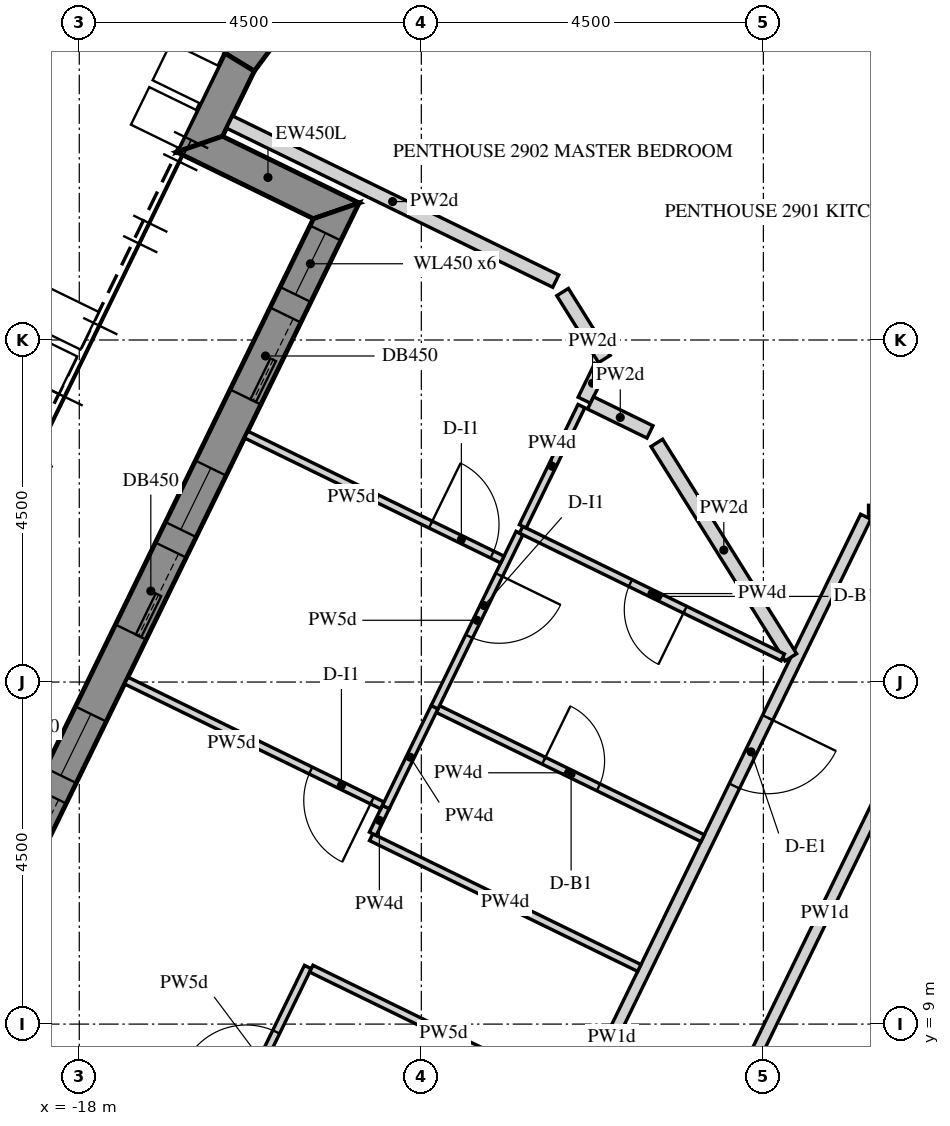
"""IFC4 building model, lengths in metres.
Left out: names, types, materials, properties, quantities, classifications, styles, units other than length and angle.
Written with IfcOpenShell. Run it as: python <this file> out.ifc"""

import sys

from ifc_helpers import new_model, si_unit, direction, frame, frame_2d, origin, place, context, subcontext, project, spatial, polyline, rectangle, outline, extrude, element, fill, save


model = new_model("IFC4")
c1 = context("Model", 3, precision=1e-05, world=origin(), true_north=direction((0.0, 1.0)))
c2 = subcontext(c1, "Body", "Model", "MODEL_VIEW")
j1 = project(units=[si_unit("LENGTHUNIT", "METRE"), si_unit("PLANEANGLEUNIT", "RADIAN")], contexts=[c1])
p1 = place(None, origin())
s1 = spatial("IfcSite", under=j1, at=p1, CompositionType="ELEMENT")
p2 = place(p1, origin())
s2 = spatial("IfcBuilding", under=s1, at=p2, CompositionType="ELEMENT")
p3 = place(p2, frame((0.0, 0.0, 369.0)))
s3 = spatial("IfcBuildingStorey", under=s2, at=p3, CompositionType="ELEMENT", Elevation=369.0)
p4 = place(p3, frame((-15.056, 22.776, -0.15), z_axis=(0.0, 0.0, 1.0), x_axis=(-0.597089203515, -0.802174845682, 0.0)))
e1 = element("IfcWall", 1, at=p4, inside=s3, PredefinedType="SOLIDWALL", context=c2, shape_type="SweptSolid", body=[
    extrude(outline(polyline([(-0.042, -0.225), (1.418, -0.225), (1.376, 0.225), (0.042, 0.225), (-0.042, -0.225)])), origin(), (0.0, 0.0, 1.0), 3.9),
])
p5 = place(p3, frame((-15.89, 21.655, -0.15), z_axis=(0.0, 0.0, 1.0), x_axis=(-0.438319390103, -0.898819287877, 0.0)))
e2 = element("IfcWall", 2, at=p5, inside=s3, PredefinedType="SOLIDWALL", context=c2, shape_type="SweptSolid", body=[
    extrude(outline(polyline([(-0.021, -0.225), (1.425, -0.225), (0.975, 0.225), (0.021, 0.225), (-0.021, -0.225)])), origin(), (0.0, 0.0, 1.0), 3.9),
])
p6 = place(p3, frame((-16.416, 20.576, -0.15), z_axis=(0.0, 0.0, 1.0), x_axis=(0.898730898244, -0.438500595829, 0.0)))
e3 = element("IfcWall", 3, at=p6, inside=s3, PredefinedType="SOLIDWALL", context=c2, shape_type="SweptSolid", body=[
    extrude(outline(polyline([(-0.225, -0.225), (1.775, -0.225), (2.225, 0.225), (0.225, 0.225), (-0.225, -0.225)])), origin(), (0.0, 0.0, 1.0), 3.9),
])
p7 = place(p3, frame((-14.619, 19.699, -0.15), z_axis=(0.0, 0.0, 1.0), x_axis=(-0.438373747484, -0.898792777851, 0.0)))
e4 = element("IfcWall", 4, at=p7, inside=s3, PredefinedType="SOLIDWALL", context=c2, shape_type="SweptSolid", body=[
    extrude(outline(polyline([(0.225, -0.225), (20.506, -0.225), (20.957, 0.225), (-0.225, 0.225), (0.225, -0.225)])), origin(), (0.0, 0.0, 1.0), 3.9),
])
p8 = place(p7, frame((0.325, 0.0, 1.05)))
e5 = element("IfcOpeningElement", 5, at=p8, cuts=e4, PredefinedType="OPENING", context=c2, shape_type="SweptSolid", body=[
    extrude(rectangle(XDim=0.9, YDim=1.5, at=frame_2d((0.45, 0.75))), frame((0.0, 0.235, 0.0), z_axis=(0.0, -1.0, 0.0), x_axis=(1.0, 0.0, 0.0)), (0.0, 0.0, 1.0), 0.47),
])
p9 = place(p7, frame((1.525, 0.0, 0.15)))
e6 = element("IfcOpeningElement", 6, at=p9, cuts=e4, PredefinedType="OPENING", context=c2, shape_type="SweptSolid", body=[
    extrude(rectangle(XDim=1.2, YDim=2.4, at=frame_2d((0.6, 1.2))), frame((0.0, 0.235, 0.0), z_axis=(0.0, -1.0, 0.0), x_axis=(1.0, 0.0, 0.0)), (0.0, 0.0, 1.0), 0.47),
])
p10 = place(p7, frame((3.766, 0.0, 1.05)))
e7 = element("IfcOpeningElement", 7, at=p10, cuts=e4, PredefinedType="OPENING", context=c2, shape_type="SweptSolid", body=[
    extrude(rectangle(XDim=0.9, YDim=1.5, at=frame_2d((0.45, 0.75))), frame((0.0, 0.235, 0.0), z_axis=(0.0, -1.0, 0.0), x_axis=(1.0, 0.0, 0.0)), (0.0, 0.0, 1.0), 0.47),
])
p11 = place(p7, frame((4.966, 0.0, 0.15)))
e8 = element("IfcOpeningElement", 8, at=p11, cuts=e4, PredefinedType="OPENING", context=c2, shape_type="SweptSolid", body=[
    extrude(rectangle(XDim=1.2, YDim=2.4, at=frame_2d((0.6, 1.2))), frame((0.0, 0.235, 0.0), z_axis=(0.0, -1.0, 0.0), x_axis=(1.0, 0.0, 0.0)), (0.0, 0.0, 1.0), 0.47),
])
p12 = place(p7, frame((7.366, 0.0, 1.05)))
e9 = element("IfcOpeningElement", 9, at=p12, cuts=e4, PredefinedType="OPENING", context=c2, shape_type="SweptSolid", body=[
    extrude(rectangle(XDim=0.9, YDim=1.5, at=frame_2d((0.45, 0.75))), frame((0.0, 0.235, 0.0), z_axis=(0.0, -1.0, 0.0), x_axis=(1.0, 0.0, 0.0)), (0.0, 0.0, 1.0), 0.47),
])
p13 = place(p7, frame((8.566, 0.0, 0.15)))
e10 = element("IfcOpeningElement", 10, at=p13, cuts=e4, PredefinedType="OPENING", context=c2, shape_type="SweptSolid", body=[
    extrude(rectangle(XDim=1.2, YDim=2.4, at=frame_2d((0.6, 1.2))), frame((0.0, 0.235, 0.0), z_axis=(0.0, -1.0, 0.0), x_axis=(1.0, 0.0, 0.0)), (0.0, 0.0, 1.0), 0.47),
])
p14 = place(p7, frame((10.966, 0.0, 1.05)))
e11 = element("IfcOpeningElement", 11, at=p14, cuts=e4, PredefinedType="OPENING", context=c2, shape_type="SweptSolid", body=[
    extrude(rectangle(XDim=0.9, YDim=1.5, at=frame_2d((0.45, 0.75))), frame((0.0, 0.235, 0.0), z_axis=(0.0, -1.0, 0.0), x_axis=(1.0, 0.0, 0.0)), (0.0, 0.0, 1.0), 0.47),
])
p15 = place(p7, frame((12.166, 0.0, 0.15)))
e12 = element("IfcOpeningElement", 12, at=p15, cuts=e4, PredefinedType="OPENING", context=c2, shape_type="SweptSolid", body=[
    extrude(rectangle(XDim=1.2, YDim=2.4, at=frame_2d((0.6, 1.2))), frame((0.0, 0.235, 0.0), z_axis=(0.0, -1.0, 0.0), x_axis=(1.0, 0.0, 0.0)), (0.0, 0.0, 1.0), 0.47),
])
p16 = place(p7, frame((14.566, 0.0, 1.05)))
e13 = element("IfcOpeningElement", 13, at=p16, cuts=e4, PredefinedType="OPENING", context=c2, shape_type="SweptSolid", body=[
    extrude(rectangle(XDim=0.9, YDim=1.5, at=frame_2d((0.45, 0.75))), frame((0.0, 0.235, 0.0), z_axis=(0.0, -1.0, 0.0), x_axis=(1.0, 0.0, 0.0)), (0.0, 0.0, 1.0), 0.47),
])
p17 = place(p7, frame((15.766, 0.0, 0.15)))
e14 = element("IfcOpeningElement", 14, at=p17, cuts=e4, PredefinedType="OPENING", context=c2, shape_type="SweptSolid", body=[
    extrude(rectangle(XDim=1.2, YDim=2.4, at=frame_2d((0.6, 1.2))), frame((0.0, 0.235, 0.0), z_axis=(0.0, -1.0, 0.0), x_axis=(1.0, 0.0, 0.0)), (0.0, 0.0, 1.0), 0.47),
])
p18 = place(p7, frame((18.007, 0.0, 1.05)))
e15 = element("IfcOpeningElement", 15, at=p18, cuts=e4, PredefinedType="OPENING", context=c2, shape_type="SweptSolid", body=[
    extrude(rectangle(XDim=0.9, YDim=1.5, at=frame_2d((0.45, 0.75))), frame((0.0, 0.235, 0.0), z_axis=(0.0, -1.0, 0.0), x_axis=(1.0, 0.0, 0.0)), (0.0, 0.0, 1.0), 0.47),
])
p19 = place(p7, frame((19.207, 0.0, 0.15)))
e16 = element("IfcOpeningElement", 16, at=p19, cuts=e4, PredefinedType="OPENING", context=c2, shape_type="SweptSolid", body=[
    extrude(rectangle(XDim=1.2, YDim=2.4, at=frame_2d((0.6, 1.2))), frame((0.0, 0.235, 0.0), z_axis=(0.0, -1.0, 0.0), x_axis=(1.0, 0.0, 0.0)), (0.0, 0.0, 1.0), 0.47),
])
p20 = place(p3, frame((-5.673, 9.825, -0.15), z_axis=(0.0, 0.0, 1.0), x_axis=(-0.499995046907, -0.866028263435, 0.0)))
e17 = element("IfcWall", 17, at=p20, inside=s3, PredefinedType="SHEAR", context=c2, shape_type="SweptSolid", body=[
    extrude(outline(polyline([(-0.101, -0.175), (11.446, -0.175), (11.244, 0.175), (0.101, 0.175), (-0.101, -0.175)])), origin(), (0.0, 0.0, 1.0), 3.9),
])
p21 = place(p20, frame((4.801, 0.0, 0.15)))
e18 = element("IfcOpeningElement", 18, at=p21, cuts=e17, PredefinedType="OPENING", context=c2, shape_type="SweptSolid", body=[
    extrude(rectangle(XDim=1.8, YDim=2.4, at=frame_2d((0.9, 1.2))), frame((0.0, 0.185, 0.0), z_axis=(0.0, -1.0, 0.0), x_axis=(1.0, 0.0, 0.0)), (0.0, 0.0, 1.0), 0.37),
])
p22 = place(p3, frame((5.887, 15.75, 0.0), z_axis=(0.0, 0.0, 1.0), x_axis=(-1.0, 0.0, 0.0)))
e19 = element("IfcWall", 19, at=p22, inside=s3, PredefinedType="PARTITIONING", context=c2, shape_type="SweptSolid", body=[
    extrude(rectangle(XDim=13.503, YDim=0.15, at=frame_2d((6.752, 0.0))), origin(), (0.0, 0.0, 1.0), 2.47),
])
p23 = place(p22, frame((3.825, 0.0, 0.0)))
e20 = element("IfcOpeningElement", 20, at=p23, cuts=e19, PredefinedType="OPENING", context=c2, shape_type="SweptSolid", body=[
    extrude(rectangle(XDim=1.0, YDim=2.1, at=frame_2d((0.5, 1.05))), frame((0.0, 0.085, 0.0), z_axis=(0.0, -1.0, 0.0), x_axis=(1.0, 0.0, 0.0)), (0.0, 0.0, 1.0), 0.17),
])
p24 = place(p3, frame((-7.653, 15.675, 0.0), z_axis=(0.0, 0.0, 1.0), x_axis=(-0.438369669055, -0.898794767037, 0.0)))
e21 = element("IfcWall", 21, at=p24, inside=s3, PredefinedType="PARTITIONING", context=c2, shape_type="SweptSolid", body=[
    extrude(rectangle(XDim=15.243, YDim=0.15, at=frame_2d((7.621, 0.0))), origin(), (0.0, 0.0, 1.0), 2.47),
])
p25 = place(p24, frame((2.942, 0.0, 0.0)))
e22 = element("IfcOpeningElement", 22, at=p25, cuts=e21, PredefinedType="OPENING", context=c2, shape_type="SweptSolid", body=[
    extrude(rectangle(XDim=1.0, YDim=2.1, at=frame_2d((0.5, 1.05))), frame((0.0, 0.085, 0.0), z_axis=(0.0, -1.0, 0.0), x_axis=(1.0, 0.0, 0.0)), (0.0, 0.0, 1.0), 0.17),
])
p26 = place(p3, frame((-9.893, 6.977, 0.0), z_axis=(0.0, 0.0, 1.0), x_axis=(0.438380229518, 0.898789616299, 0.0)))
e23 = element("IfcWall", 23, at=p26, inside=s3, PredefinedType="PARTITIONING", context=c2, shape_type="SweptSolid", body=[
    extrude(rectangle(XDim=7.758, YDim=0.15, at=frame_2d((3.879, 0.0))), origin(), (0.0, 0.0, 1.0), 2.47),
])
p27 = place(p3, frame((-16.024, 20.868, 0.0), z_axis=(0.0, 0.0, 1.0), x_axis=(0.898790554329, -0.438378306317, 0.0)))
e24 = element("IfcWall", 24, at=p27, inside=s3, PredefinedType="PARTITIONING", context=c2, shape_type="SweptSolid", body=[
    extrude(rectangle(XDim=4.776, YDim=0.18, at=frame_2d((2.388, 0.0))), origin(), (0.0, 0.0, 1.0), 2.47),
])
p28 = place(p3, frame((-11.642, 18.63, 0.0), z_axis=(0.0, 0.0, 1.0), x_axis=(0.530041214548, -0.847971880949, 0.0)))
e25 = element("IfcWall", 25, at=p28, inside=s3, PredefinedType="PARTITIONING", context=c2, shape_type="SweptSolid", body=[
    extrude(rectangle(XDim=1.038, YDim=0.18, at=frame_2d((0.519, 0.0))), origin(), (0.0, 0.0, 1.0), 2.47),
])
p29 = place(p3, frame((-11.138, 17.655, 0.0), z_axis=(0.0, 0.0, 1.0), x_axis=(-0.43834617456, -0.89880622564, 0.0)))
e26 = element("IfcWall", 26, at=p29, inside=s3, PredefinedType="PARTITIONING", context=c2, shape_type="SweptSolid", body=[
    extrude(rectangle(XDim=0.497, YDim=0.18, at=frame_2d((0.249, 0.0))), origin(), (0.0, 0.0, 1.0), 2.47),
])
p30 = place(p3, frame((-11.273, 17.172, 0.0), z_axis=(0.0, 0.0, 1.0), x_axis=(0.898819713643, -0.438318517025, 0.0)))
e27 = element("IfcWall", 27, at=p30, inside=s3, PredefinedType="PARTITIONING", context=c2, shape_type="SweptSolid", body=[
    extrude(rectangle(XDim=0.869, YDim=0.18, at=frame_2d((0.435, 0.0))), origin(), (0.0, 0.0, 1.0), 2.47),
])
p31 = place(p3, frame((-10.402, 16.647, 0.0), z_axis=(0.0, 0.0, 1.0), x_axis=(0.529853827573, -0.84808898201, 0.0)))
e28 = element("IfcWall", 28, at=p31, inside=s3, PredefinedType="PARTITIONING", context=c2, shape_type="SweptSolid", body=[
    extrude(rectangle(XDim=3.327, YDim=0.18, at=frame_2d((1.664, 0.0))), origin(), (0.0, 0.0, 1.0), 2.47),
])
p32 = place(p3, frame((-10.632, 9.738, 0.0), z_axis=(0.0, 0.0, 1.0), x_axis=(-0.898787574002, 0.438384416717, 0.0)))
e29 = element("IfcWall", 29, at=p32, inside=s3, PredefinedType="PARTITIONING", context=c2, shape_type="SweptSolid", body=[
    extrude(rectangle(XDim=3.925, YDim=0.1, at=frame_2d((1.962, 0.0))), origin(), (0.0, 0.0, 1.0), 2.47),
])
p33 = place(p3, frame((-14.138, 11.504, 0.0), z_axis=(0.0, 0.0, 1.0), x_axis=(0.438214838481, 0.898870266131, 0.0)))
e30 = element("IfcWall", 30, at=p33, inside=s3, PredefinedType="PARTITIONING", context=c2, shape_type="SweptSolid", body=[
    extrude(rectangle(XDim=0.392, YDim=0.1, at=frame_2d((0.196, 0.0))), origin(), (0.0, 0.0, 1.0), 2.47),
])
p34 = place(p3, frame((-14.012, 11.876, 0.0), z_axis=(0.0, 0.0, 1.0), x_axis=(-0.898810362659, 0.438337691713, 0.0)))
e31 = element("IfcWall", 31, at=p34, inside=s3, PredefinedType="PARTITIONING", context=c2, shape_type="SweptSolid", body=[
    extrude(rectangle(XDim=3.75, YDim=0.1, at=frame_2d((1.875, 0.0))), origin(), (0.0, 0.0, 1.0), 2.47),
])
p35 = place(p34, frame((0.15, 0.0, 0.0)))
e32 = element("IfcOpeningElement", 32, at=p35, cuts=e31, PredefinedType="OPENING", context=c2, shape_type="SweptSolid", body=[
    extrude(rectangle(XDim=0.9, YDim=2.1, at=frame_2d((0.45, 1.05))), frame((0.0, 0.06, 0.0), z_axis=(0.0, -1.0, 0.0), x_axis=(1.0, 0.0, 0.0)), (0.0, 0.0, 1.0), 0.12),
])
p36 = place(p3, frame((-16.198, 7.28, 0.0), z_axis=(0.0, 0.0, 1.0), x_axis=(0.438385151252, 0.898787215731, 0.0)))
e33 = element("IfcWall", 33, at=p36, inside=s3, PredefinedType="PARTITIONING", context=c2, shape_type="SweptSolid", body=[
    extrude(rectangle(XDim=2.75, YDim=0.1, at=frame_2d((1.375, 0.0))), origin(), (0.0, 0.0, 1.0), 2.47),
])
p37 = place(p36, frame((0.9, 0.0, 0.0)))
e34 = element("IfcOpeningElement", 34, at=p37, cuts=e33, PredefinedType="OPENING", context=c2, shape_type="SweptSolid", body=[
    extrude(rectangle(XDim=0.9, YDim=2.1, at=frame_2d((0.45, 1.05))), frame((0.0, 0.06, 0.0), z_axis=(0.0, -1.0, 0.0), x_axis=(1.0, 0.0, 0.0)), (0.0, 0.0, 1.0), 0.12),
])
p38 = place(p3, frame((-14.948, 9.729, 0.0), z_axis=(0.0, 0.0, 1.0), x_axis=(0.898793875229, -0.438371497535, 0.0)))
e35 = element("IfcWall", 35, at=p38, inside=s3, PredefinedType="PARTITIONING", context=c2, shape_type="SweptSolid", body=[
    extrude(rectangle(XDim=3.875, YDim=0.1, at=frame_2d((1.938, 0.0))), origin(), (0.0, 0.0, 1.0), 2.47),
])
p39 = place(p3, frame((-13.327, 13.167, 0.0), z_axis=(0.0, 0.0, 1.0), x_axis=(0.898812080899, -0.438334168449, 0.0)))
e36 = element("IfcWall", 36, at=p39, inside=s3, PredefinedType="PARTITIONING", context=c2, shape_type="SweptSolid", body=[
    extrude(rectangle(XDim=3.925, YDim=0.1, at=frame_2d((1.962, 0.0))), origin(), (0.0, 0.0, 1.0), 2.47),
])
p40 = place(p39, frame((1.6, 0.0, 0.0)))
e37 = element("IfcOpeningElement", 37, at=p40, cuts=e36, PredefinedType="OPENING", context=c2, shape_type="SweptSolid", body=[
    extrude(rectangle(XDim=0.8, YDim=2.1, at=frame_2d((0.4, 1.05))), frame((0.0, 0.06, 0.0), z_axis=(0.0, -1.0, 0.0), x_axis=(1.0, 0.0, 0.0)), (0.0, 0.0, 1.0), 0.12),
])
p41 = place(p3, frame((-12.208, 15.46, 0.0), z_axis=(0.0, 0.0, 1.0), x_axis=(-0.438359600369, -0.898799677773, 0.0)))
e38 = element("IfcWall", 38, at=p41, inside=s3, PredefinedType="PARTITIONING", context=c2, shape_type="SweptSolid", body=[
    extrude(rectangle(XDim=2.554, YDim=0.1, at=frame_2d((1.277, 0.0))), origin(), (0.0, 0.0, 1.0), 2.47),
])
p42 = place(p41, frame((0.612, 0.0, 0.0)))
e39 = element("IfcOpeningElement", 39, at=p42, cuts=e38, PredefinedType="OPENING", context=c2, shape_type="SweptSolid", body=[
    extrude(rectangle(XDim=0.9, YDim=2.1, at=frame_2d((0.45, 1.05))), frame((0.0, 0.06, 0.0), z_axis=(0.0, -1.0, 0.0), x_axis=(1.0, 0.0, 0.0)), (0.0, 0.0, 1.0), 0.12),
])
p43 = place(p3, frame((-8.745, 13.824, 0.0), z_axis=(0.0, 0.0, 1.0), x_axis=(-0.898794787177, 0.43836962776, 0.0)))
e40 = element("IfcWall", 40, at=p43, inside=s3, PredefinedType="PARTITIONING", context=c2, shape_type="SweptSolid", body=[
    extrude(rectangle(XDim=3.83, YDim=0.1, at=frame_2d((1.915, 0.0))), origin(), (0.0, 0.0, 1.0), 2.47),
])
p44 = place(p43, frame((1.43, 0.0, 0.0)))
e41 = element("IfcOpeningElement", 41, at=p44, cuts=e40, PredefinedType="OPENING", context=c2, shape_type="SweptSolid", body=[
    extrude(rectangle(XDim=0.8, YDim=2.1, at=frame_2d((0.4, 1.05))), frame((0.0, 0.06, 0.0), z_axis=(0.0, -1.0, 0.0), x_axis=(1.0, 0.0, 0.0)), (0.0, 0.0, 1.0), 0.12),
])
p45 = place(p3, frame((-13.326, 13.168, 0.0), z_axis=(0.0, 0.0, 1.0), x_axis=(-0.438377585285, -0.898790906006, 0.0)))
e42 = element("IfcWall", 42, at=p45, inside=s3, PredefinedType="PARTITIONING", context=c2, shape_type="SweptSolid", body=[
    extrude(rectangle(XDim=1.462, YDim=0.1, at=frame_2d((0.731, 0.0))), origin(), (0.0, 0.0, 1.0), 2.47),
])
p46 = place(p3, frame((-15.804, 16.756, 0.0), z_axis=(0.0, 0.0, 1.0), x_axis=(0.89878471246, -0.438390283479, 0.0)))
e43 = element("IfcWall", 43, at=p46, inside=s3, PredefinedType="PARTITIONING", context=c2, shape_type="SweptSolid", body=[
    extrude(rectangle(XDim=3.75, YDim=0.1, at=frame_2d((1.875, 0.0))), origin(), (0.0, 0.0, 1.0), 2.47),
])
p47 = place(p46, frame((2.7, 0.0, 0.0)))
e44 = element("IfcOpeningElement", 44, at=p47, cuts=e43, PredefinedType="OPENING", context=c2, shape_type="SweptSolid", body=[
    extrude(rectangle(XDim=0.9, YDim=2.1, at=frame_2d((0.45, 1.05))), frame((0.0, 0.06, 0.0), z_axis=(0.0, -1.0, 0.0), x_axis=(1.0, 0.0, 0.0)), (0.0, 0.0, 1.0), 0.12),
])
p48 = place(p3, frame((-12.165, 15.548, 0.0), z_axis=(0.0, 0.0, 1.0), x_axis=(0.438426364669, 0.89876711264, 0.0)))
e45 = element("IfcWall", 45, at=p48, inside=s3, PredefinedType="PARTITIONING", context=c2, shape_type="SweptSolid", body=[
    extrude(rectangle(XDim=1.76, YDim=0.1, at=frame_2d((0.88, 0.0))), origin(), (0.0, 0.0, 1.0), 2.47),
])
p49 = place(p8, frame((0.0, 0.155, 0.0)))
e46 = element("IfcWindow", 46, at=p49, inside=s3, PartitioningType="SINGLE_PANEL", PredefinedType="WINDOW", context=c2, shape_type="SweptSolid", body=[
    extrude(rectangle(XDim=0.9, YDim=1.5, at=frame_2d((0.45, 0.75))), frame((0.0, 0.03, 0.0), z_axis=(0.0, -1.0, 0.0), x_axis=(1.0, 0.0, 0.0)), (0.0, 0.0, 1.0), 0.06),
])
fill(e5, e46)
p50 = place(p9, frame((0.0, 0.15, 0.0)))
e47 = element("IfcDoor", 47, at=p50, inside=s3, OperationType="SLIDING_TO_LEFT", PredefinedType="DOOR", context=c2, shape_type="SweptSolid", body=[
    extrude(rectangle(XDim=1.2, YDim=2.4, at=frame_2d((0.6, 1.2))), frame((0.0, 0.025, 0.0), z_axis=(0.0, -1.0, 0.0), x_axis=(1.0, 0.0, 0.0)), (0.0, 0.0, 1.0), 0.05),
])
fill(e6, e47)
p51 = place(p10, frame((0.0, 0.155, 0.0)))
e48 = element("IfcWindow", 48, at=p51, inside=s3, PartitioningType="SINGLE_PANEL", PredefinedType="WINDOW", context=c2, shape_type="SweptSolid", body=[
    extrude(rectangle(XDim=0.9, YDim=1.5, at=frame_2d((0.45, 0.75))), frame((0.0, 0.03, 0.0), z_axis=(0.0, -1.0, 0.0), x_axis=(1.0, 0.0, 0.0)), (0.0, 0.0, 1.0), 0.06),
])
fill(e7, e48)
p52 = place(p11, frame((0.0, 0.15, 0.0)))
e49 = element("IfcDoor", 49, at=p52, inside=s3, OperationType="SLIDING_TO_LEFT", PredefinedType="DOOR", context=c2, shape_type="SweptSolid", body=[
    extrude(rectangle(XDim=1.2, YDim=2.4, at=frame_2d((0.6, 1.2))), frame((0.0, 0.025, 0.0), z_axis=(0.0, -1.0, 0.0), x_axis=(1.0, 0.0, 0.0)), (0.0, 0.0, 1.0), 0.05),
])
fill(e8, e49)
p53 = place(p12, frame((0.0, 0.155, 0.0)))
e50 = element("IfcWindow", 50, at=p53, inside=s3, PartitioningType="SINGLE_PANEL", PredefinedType="WINDOW", context=c2, shape_type="SweptSolid", body=[
    extrude(rectangle(XDim=0.9, YDim=1.5, at=frame_2d((0.45, 0.75))), frame((0.0, 0.03, 0.0), z_axis=(0.0, -1.0, 0.0), x_axis=(1.0, 0.0, 0.0)), (0.0, 0.0, 1.0), 0.06),
])
fill(e9, e50)
p54 = place(p13, frame((0.0, 0.15, 0.0)))
e51 = element("IfcDoor", 51, at=p54, inside=s3, OperationType="SLIDING_TO_LEFT", PredefinedType="DOOR", context=c2, shape_type="SweptSolid", body=[
    extrude(rectangle(XDim=1.2, YDim=2.4, at=frame_2d((0.6, 1.2))), frame((0.0, 0.025, 0.0), z_axis=(0.0, -1.0, 0.0), x_axis=(1.0, 0.0, 0.0)), (0.0, 0.0, 1.0), 0.05),
])
fill(e10, e51)
p55 = place(p25, origin())
e52 = element("IfcDoor", 52, at=p55, inside=s3, OperationType="SINGLE_SWING_RIGHT", PredefinedType="DOOR", context=c2, shape_type="SweptSolid", body=[
    extrude(rectangle(XDim=1.0, YDim=2.1, at=frame_2d((0.5, 1.05))), frame((0.0, 0.025, 0.0), z_axis=(0.0, -1.0, 0.0), x_axis=(1.0, 0.0, 0.0)), (0.0, 0.0, 1.0), 0.05),
])
fill(e22, e52)
p56 = place(p40, origin())
e53 = element("IfcDoor", 53, at=p56, inside=s3, OperationType="SINGLE_SWING_LEFT", PredefinedType="DOOR", context=c2, shape_type="SweptSolid", body=[
    extrude(rectangle(XDim=0.8, YDim=2.1, at=frame_2d((0.4, 1.05))), frame((0.0, 0.025, 0.0), z_axis=(0.0, -1.0, 0.0), x_axis=(1.0, 0.0, 0.0)), (0.0, 0.0, 1.0), 0.05),
])
fill(e37, e53)
p57 = place(p42, origin())
e54 = element("IfcDoor", 54, at=p57, inside=s3, OperationType="SINGLE_SWING_LEFT", PredefinedType="DOOR", context=c2, shape_type="SweptSolid", body=[
    extrude(rectangle(XDim=0.9, YDim=2.1, at=frame_2d((0.45, 1.05))), frame((0.0, 0.025, 0.0), z_axis=(0.0, -1.0, 0.0), x_axis=(1.0, 0.0, 0.0)), (0.0, 0.0, 1.0), 0.05),
])
fill(e39, e54)
p58 = place(p47, origin())
e55 = element("IfcDoor", 55, at=p58, inside=s3, OperationType="SINGLE_SWING_RIGHT", PredefinedType="DOOR", context=c2, shape_type="SweptSolid", body=[
    extrude(rectangle(XDim=0.9, YDim=2.1, at=frame_2d((0.45, 1.05))), frame((0.0, 0.025, 0.0), z_axis=(0.0, -1.0, 0.0), x_axis=(1.0, 0.0, 0.0)), (0.0, 0.0, 1.0), 0.05),
])
fill(e44, e55)
p59 = place(p35, origin())
e56 = element("IfcDoor", 56, at=p59, inside=s3, OperationType="SINGLE_SWING_RIGHT", PredefinedType="DOOR", context=c2, shape_type="SweptSolid", body=[
    extrude(rectangle(XDim=0.9, YDim=2.1, at=frame_2d((0.45, 1.05))), frame((0.0, 0.025, 0.0), z_axis=(0.0, -1.0, 0.0), x_axis=(1.0, 0.0, 0.0)), (0.0, 0.0, 1.0), 0.05),
])
fill(e32, e56)
p60 = place(p44, origin())
e57 = element("IfcDoor", 57, at=p60, inside=s3, OperationType="SINGLE_SWING_RIGHT", PredefinedType="DOOR", context=c2, shape_type="SweptSolid", body=[
    extrude(rectangle(XDim=0.8, YDim=2.1, at=frame_2d((0.4, 1.05))), frame((0.0, 0.025, 0.0), z_axis=(0.0, -1.0, 0.0), x_axis=(1.0, 0.0, 0.0)), (0.0, 0.0, 1.0), 0.05),
])
fill(e41, e57)
p61 = place(p37, origin())
e58 = element("IfcDoor", 58, at=p61, inside=s3, OperationType="SINGLE_SWING_LEFT", PredefinedType="DOOR", context=c2, shape_type="SweptSolid", body=[
    extrude(rectangle(XDim=0.9, YDim=2.1, at=frame_2d((0.45, 1.05))), frame((0.0, 0.025, 0.0), z_axis=(0.0, -1.0, 0.0), x_axis=(1.0, 0.0, 0.0)), (0.0, 0.0, 1.0), 0.05),
])
fill(e34, e58)
save(model, sys.argv[1])
